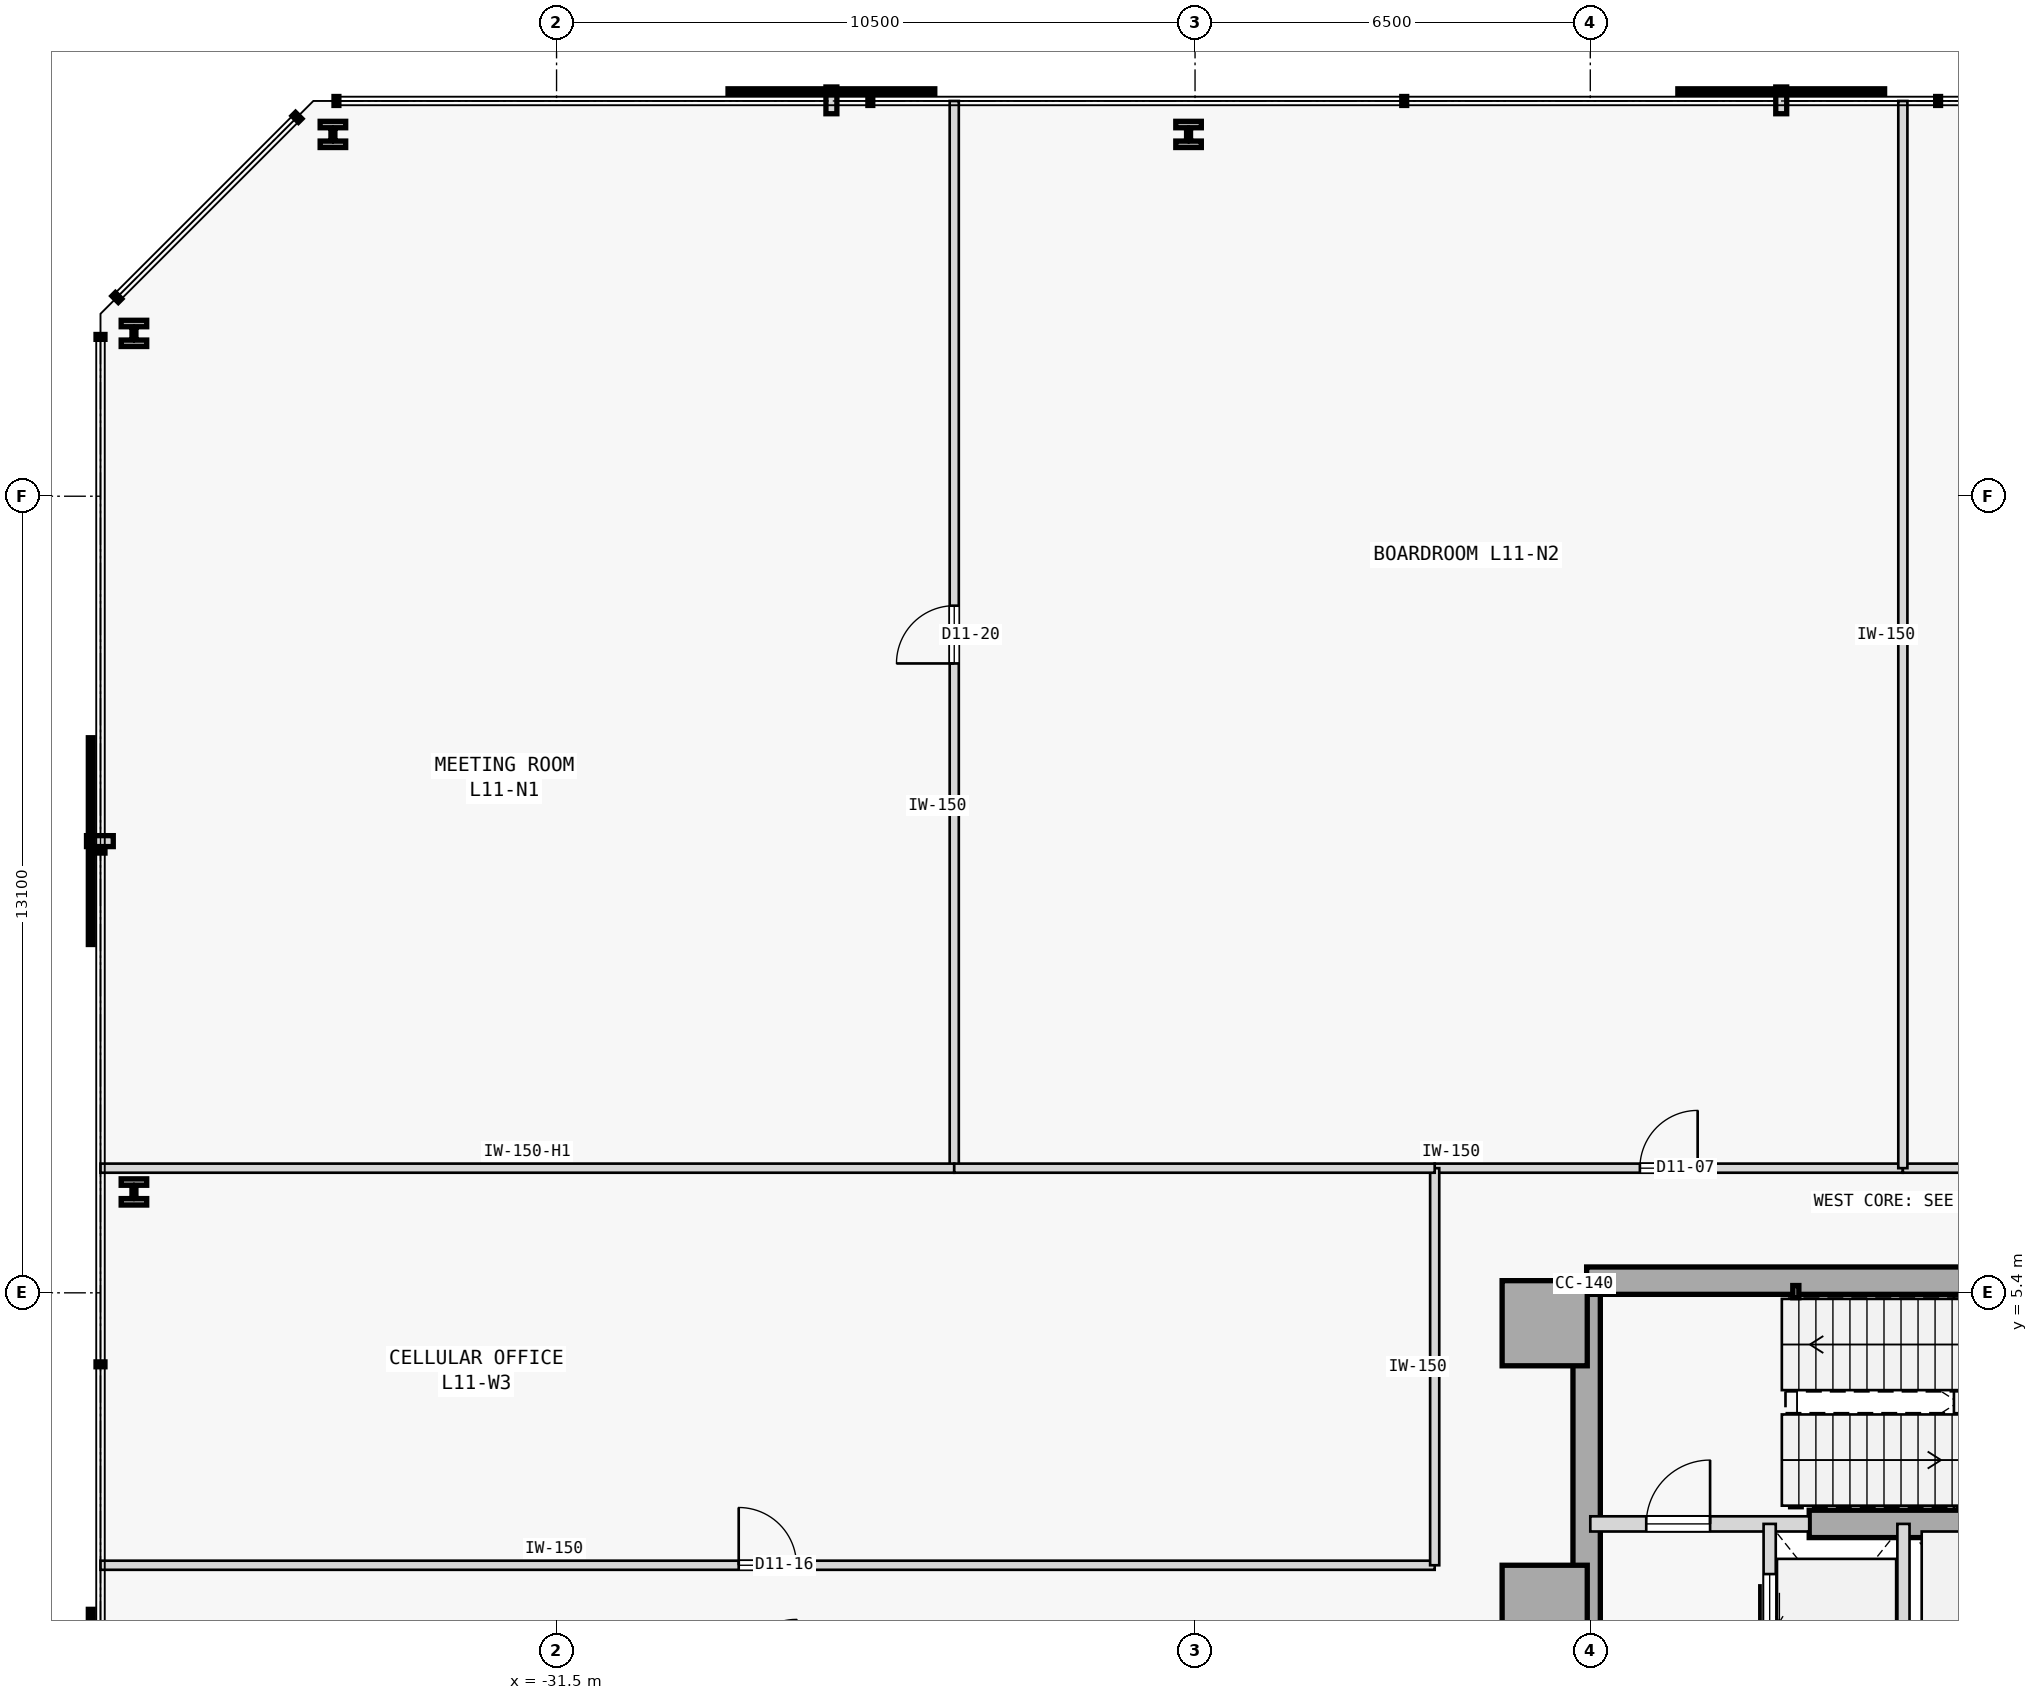
"""IFC4 building model, lengths in metres.
Left out: names, types, materials, properties, quantities, classifications, styles, units other than length and angle.
Written with IfcOpenShell. Run it as: python <this file> out.ifc"""

import sys

from ifc_helpers import new_model, si_unit, direction, frame, frame_2d, origin, origin_2d, place, context, subcontext, project, spatial, rectangle, hollow_rectangle, i_section, extrude, element, fill, save


model = new_model("IFC4")
c1 = context("Model", 3, precision=1e-05, world=origin(), true_north=direction((0.0, 1.0)))
c2 = subcontext(c1, "Body", "Model", "MODEL_VIEW")
j1 = project(units=[si_unit("LENGTHUNIT", "METRE"), si_unit("PLANEANGLEUNIT", "RADIAN")], contexts=[c1])
p1 = place(None, origin())
s1 = spatial("IfcSite", under=j1, at=p1, CompositionType="ELEMENT")
p2 = place(p1, origin())
s2 = spatial("IfcBuilding", under=s1, at=p2, CompositionType="ELEMENT")
p3 = place(p2, frame((0.0, 0.0, 48.4)))
s3 = spatial("IfcBuildingStorey", under=s2, at=p3, CompositionType="ELEMENT", Elevation=48.4)
for number, where, z_axis, x_axis in (
    (1, (-15.25, 4.9, 0.0), (0.0, 0.0, 1.0), (1.0, 0.0, 0.0)),
    (2, (-15.25, 0.22, 0.0), (0.0, 0.0, 1.0), (1.0, 0.0, 0.0)),
):
    element("IfcColumn", number, at=place(p3, frame(where, z_axis=z_axis, x_axis=x_axis)), inside=s3, PredefinedType="COLUMN", context=c2, shape_type="SweptSolid", body=[
        extrude(rectangle(XDim=1.4, YDim=1.4, at=origin_2d()), origin(), (0.0, 0.0, 1.0), 3.8),
    ])
p4 = place(p3, frame((-14.56, 5.6, 0.0), z_axis=(0.0, 0.0, 1.0), x_axis=(1.0, 0.0, 0.0)))
e3 = element("IfcWall", 3, at=p4, inside=s3, PredefinedType="SHEAR", context=c2, shape_type="SweptSolid", body=[
    extrude(rectangle(XDim=11.41, YDim=0.45, at=frame_2d((5.705, 0.0))), origin(), (0.0, 0.0, 1.0), 3.575),
])
p5 = place(p3, frame((-14.56, -5.375, 0.0), z_axis=(0.0, 0.0, 1.0), x_axis=(0.0, 1.0, 0.0)))
e4 = element("IfcWall", 4, at=p5, inside=s3, PredefinedType="SHEAR", context=c2, shape_type="SweptSolid", body=[
    extrude(rectangle(XDim=10.75, YDim=0.45, at=frame_2d((5.375, 0.0))), origin(), (0.0, 0.0, 1.0), 3.575),
])
p6 = place(p3, frame((-10.9, 1.6, 0.0), z_axis=(0.0, 0.0, 1.0), x_axis=(1.0, 0.0, 0.0)))
e5 = element("IfcWall", 5, at=p6, inside=s3, PredefinedType="SHEAR", context=c2, shape_type="SweptSolid", body=[
    extrude(rectangle(XDim=5.15, YDim=0.45, at=frame_2d((2.575, 0.0))), origin(), (0.0, 0.0, 1.0), 3.575),
])
p7 = place(p3, frame((-11.12, 5.42, 0.0), z_axis=(0.0, 0.0, 1.0), x_axis=(1.0, 0.0, 0.0)))
e6 = element("IfcColumn", 6, at=p7, inside=s3, PredefinedType="COLUMN", context=c2, shape_type="SweptSolid", body=[
    extrude(hollow_rectangle(XDim=0.1, YDim=0.2, WallThickness=0.008, at=origin_2d()), origin(), (0.0, 0.0, 1.0), 3.8),
])
for number, where, z_axis, x_axis in (
    (7, (-21.107, 24.45, 0.0), (0.0, 0.0, 1.0), (1.0, 0.0, 0.0)),
    (8, (-35.178, 24.45, 0.0), (0.0, 0.0, 1.0), (1.0, 0.0, 0.0)),
    (9, (-38.45, 21.178, 0.0), (0.0, 0.0, 1.0), (1.0, 0.0, 0.0)),
    (10, (-38.45, 7.059, 0.0), (0.0, 0.0, 1.0), (1.0, 0.0, 0.0)),
):
    element("IfcColumn", number, at=place(p3, frame(where, z_axis=z_axis, x_axis=x_axis)), inside=s3, PredefinedType="COLUMN", context=c2, shape_type="SweptSolid", body=[
        extrude(i_section(OverallWidth=0.42, OverallDepth=0.431, WebThickness=0.065, FlangeThickness=0.106, FilletRadius=0.015, at=origin_2d()), origin(), (0.0, 0.0, 1.0), 3.8),
    ])
p8 = place(p3, frame((-14.5, 1.6, 0.0), z_axis=(0.0, 0.0, 1.0), x_axis=(1.0, 0.0, 0.0)))
e11 = element("IfcWall", 11, at=p8, inside=s3, PredefinedType="STANDARD", context=c2, shape_type="SweptSolid", body=[
    extrude(rectangle(XDim=3.6, YDim=0.25, at=frame_2d((1.8, 0.0))), origin(), (0.0, 0.0, 1.0), 3.575),
])
p9 = place(p8, frame((0.92, 0.0, 0.0)))
e12 = element("IfcOpeningElement", 12, at=p9, cuts=e11, PredefinedType="OPENING", context=c2, shape_type="SweptSolid", body=[
    extrude(rectangle(XDim=1.05, YDim=2.15, at=frame_2d((0.525, 1.075))), frame((0.0, 0.135, 0.0), z_axis=(0.0, -1.0, 0.0), x_axis=(1.0, 0.0, 0.0)), (0.0, 0.0, 1.0), 0.27),
])
p10 = place(p3, frame((-11.55, -1.15, 0.0), z_axis=(0.0, 0.0, 1.0), x_axis=(0.0, 1.0, 0.0)))
e13 = element("IfcWall", 13, at=p10, inside=s3, PredefinedType="STANDARD", context=c2, shape_type="SweptSolid", body=[
    extrude(rectangle(XDim=2.75, YDim=0.2, at=frame_2d((1.375, 0.0))), origin(), (0.0, 0.0, 1.0), 3.575),
])
p11 = place(p10, frame((0.825, 0.0, 0.0)))
e14 = element("IfcOpeningElement", 14, at=p11, cuts=e13, PredefinedType="OPENING", context=c2, shape_type="SweptSolid", body=[
    extrude(rectangle(XDim=1.1, YDim=2.15, at=frame_2d((0.55, 1.075))), frame((0.0, 0.11, 0.0), z_axis=(0.0, -1.0, 0.0), x_axis=(1.0, 0.0, 0.0)), (0.0, 0.0, 1.0), 0.22),
])
p12 = place(p3, frame((-9.35, -1.15, 0.0), z_axis=(0.0, 0.0, 1.0), x_axis=(0.0, 1.0, 0.0)))
e15 = element("IfcWall", 15, at=p12, inside=s3, PredefinedType="STANDARD", context=c2, shape_type="SweptSolid", body=[
    extrude(rectangle(XDim=2.75, YDim=0.2, at=frame_2d((1.375, 0.0))), origin(), (0.0, 0.0, 1.0), 3.575),
])
p13 = place(p3, frame((-17.059, 7.45, 0.0), z_axis=(0.0, 0.0, 1.0), x_axis=(1.0, 0.0, 0.0)))
e16 = element("IfcWall", 16, at=p13, inside=s3, PredefinedType="PARTITIONING", context=c2, shape_type="SweptSolid", body=[
    extrude(rectangle(XDim=7.699, YDim=0.15, at=frame_2d((3.85, 0.0))), origin(), (0.0, 0.0, 1.0), 3.575),
])
p14 = place(p13, frame((3.375, 0.0, 0.0)))
e17 = element("IfcOpeningElement", 17, at=p14, cuts=e16, PredefinedType="OPENING", context=c2, shape_type="SweptSolid", body=[
    extrude(rectangle(XDim=0.95, YDim=2.15, at=frame_2d((0.475, 1.075))), frame((0.0, 0.085, 0.0), z_axis=(0.0, -1.0, 0.0), x_axis=(1.0, 0.0, 0.0)), (0.0, 0.0, 1.0), 0.17),
])
p15 = place(p3, frame((-9.36, 7.45, 0.0), z_axis=(0.0, 0.0, 1.0), x_axis=(1.0, 0.0, 0.0)))
e18 = element("IfcWall", 18, at=p15, inside=s3, PredefinedType="PARTITIONING", context=c2, shape_type="SweptSolid", body=[
    extrude(rectangle(XDim=8.44, YDim=0.15, at=frame_2d((4.22, 0.0))), origin(), (0.0, 0.0, 1.0), 3.575),
])
p16 = place(p3, frame((-39.0, 0.92, 0.0), z_axis=(0.0, 0.0, 1.0), x_axis=(1.0, 0.0, 0.0)))
e19 = element("IfcWall", 19, at=p16, inside=s3, PredefinedType="PARTITIONING", context=c2, shape_type="SweptSolid", body=[
    extrude(rectangle(XDim=21.941, YDim=0.15, at=frame_2d((10.97, 0.0))), origin(), (0.0, 0.0, 1.0), 3.575),
])
p17 = place(p16, frame((10.496, 0.0, 0.0)))
e20 = element("IfcOpeningElement", 20, at=p17, cuts=e19, PredefinedType="OPENING", context=c2, shape_type="SweptSolid", body=[
    extrude(rectangle(XDim=0.95, YDim=2.15, at=frame_2d((0.475, 1.075))), frame((0.0, 0.085, 0.0), z_axis=(0.0, -1.0, 0.0), x_axis=(1.0, 0.0, 0.0)), (0.0, 0.0, 1.0), 0.17),
])
p18 = place(p3, frame((-17.059, 0.92, 0.0), z_axis=(0.0, 0.0, 1.0), x_axis=(0.0, 1.0, 0.0)))
e21 = element("IfcWall", 21, at=p18, inside=s3, PredefinedType="PARTITIONING", context=c2, shape_type="SweptSolid", body=[
    extrude(rectangle(XDim=6.53, YDim=0.15, at=frame_2d((3.265, 0.0))), origin(), (0.0, 0.0, 1.0), 3.575),
])
p19 = place(p3, frame((-24.96, 7.45, 0.0), z_axis=(0.0, 0.0, 1.0), x_axis=(0.0, 1.0, 0.0)))
e22 = element("IfcWall", 22, at=p19, inside=s3, PredefinedType="PARTITIONING", context=c2, shape_type="SweptSolid", body=[
    extrude(rectangle(XDim=17.55, YDim=0.15, at=frame_2d((8.775, 0.0))), origin(), (0.0, 0.0, 1.0), 3.575),
])
p20 = place(p19, frame((8.3, 0.0, 0.0)))
e23 = element("IfcOpeningElement", 23, at=p20, cuts=e22, PredefinedType="OPENING", context=c2, shape_type="SweptSolid", body=[
    extrude(rectangle(XDim=0.95, YDim=2.15, at=frame_2d((0.475, 1.075))), frame((0.0, 0.085, 0.0), z_axis=(0.0, -1.0, 0.0), x_axis=(1.0, 0.0, 0.0)), (0.0, 0.0, 1.0), 0.17),
])
p21 = place(p3, frame((-39.0, 7.45, 0.0), z_axis=(0.0, 0.0, 1.0), x_axis=(1.0, 0.0, 0.0)))
e24 = element("IfcWall", 24, at=p21, inside=s3, PredefinedType="PARTITIONING", context=c2, shape_type="SweptSolid", body=[
    extrude(rectangle(XDim=14.04, YDim=0.15, at=frame_2d((7.02, 0.0))), origin(), (0.0, 0.0, 1.0), 3.125),
])
p22 = place(p3, frame((-9.36, 7.45, 0.0), z_axis=(0.0, 0.0, 1.0), x_axis=(0.0, 1.0, 0.0)))
e25 = element("IfcWall", 25, at=p22, inside=s3, PredefinedType="PARTITIONING", context=c2, shape_type="SweptSolid", body=[
    extrude(rectangle(XDim=17.55, YDim=0.15, at=frame_2d((8.775, 0.0))), origin(), (0.0, 0.0, 1.0), 3.575),
])
p23 = place(p3, frame((-24.96, 7.45, 0.0), z_axis=(0.0, 0.0, 1.0), x_axis=(1.0, 0.0, 0.0)))
e26 = element("IfcWall", 26, at=p23, inside=s3, PredefinedType="PARTITIONING", context=c2, shape_type="SweptSolid", body=[
    extrude(rectangle(XDim=7.901, YDim=0.15, at=frame_2d((3.95, 0.0))), origin(), (0.0, 0.0, 1.0), 3.575),
])
p24 = place(p9, origin())
e27 = element("IfcDoor", 27, at=p24, inside=s3, OperationType="SINGLE_SWING_RIGHT", PredefinedType="DOOR", context=c2, shape_type="SweptSolid", body=[
    extrude(rectangle(XDim=1.05, YDim=2.15, at=frame_2d((0.525, 1.075))), frame((0.0, 0.025, 0.0), z_axis=(0.0, -1.0, 0.0), x_axis=(1.0, 0.0, 0.0)), (0.0, 0.0, 1.0), 0.05),
])
fill(e12, e27)
p25 = place(p11, origin())
e28 = element("IfcDoor", 28, at=p25, inside=s3, OperationType="SLIDING_TO_RIGHT", PredefinedType="DOOR", context=c2, shape_type="SweptSolid", body=[
    extrude(rectangle(XDim=1.1, YDim=2.15, at=frame_2d((0.55, 1.075))), frame((0.0, 0.025, 0.0), z_axis=(0.0, -1.0, 0.0), x_axis=(1.0, 0.0, 0.0)), (0.0, 0.0, 1.0), 0.05),
])
fill(e14, e28)
p26 = place(p14, origin())
e29 = element("IfcDoor", 29, at=p26, inside=s3, OperationType="SINGLE_SWING_RIGHT", PredefinedType="DOOR", context=c2, shape_type="SweptSolid", body=[
    extrude(rectangle(XDim=0.95, YDim=2.15, at=frame_2d((0.475, 1.075))), frame((0.0, 0.025, 0.0), z_axis=(0.0, -1.0, 0.0), x_axis=(1.0, 0.0, 0.0)), (0.0, 0.0, 1.0), 0.05),
])
fill(e17, e29)
p27 = place(p17, origin())
e30 = element("IfcDoor", 30, at=p27, inside=s3, OperationType="SINGLE_SWING_LEFT", PredefinedType="DOOR", context=c2, shape_type="SweptSolid", body=[
    extrude(rectangle(XDim=0.95, YDim=2.15, at=frame_2d((0.475, 1.075))), frame((0.0, 0.025, 0.0), z_axis=(0.0, -1.0, 0.0), x_axis=(1.0, 0.0, 0.0)), (0.0, 0.0, 1.0), 0.05),
])
fill(e20, e30)
p28 = place(p20, origin())
e31 = element("IfcDoor", 31, at=p28, inside=s3, OperationType="SINGLE_SWING_LEFT", PredefinedType="DOOR", context=c2, shape_type="SweptSolid", body=[
    extrude(rectangle(XDim=0.95, YDim=2.15, at=frame_2d((0.475, 1.075))), frame((0.0, 0.025, 0.0), z_axis=(0.0, -1.0, 0.0), x_axis=(1.0, 0.0, 0.0)), (0.0, 0.0, 1.0), 0.05),
])
fill(e23, e31)
save(model, sys.argv[1])
